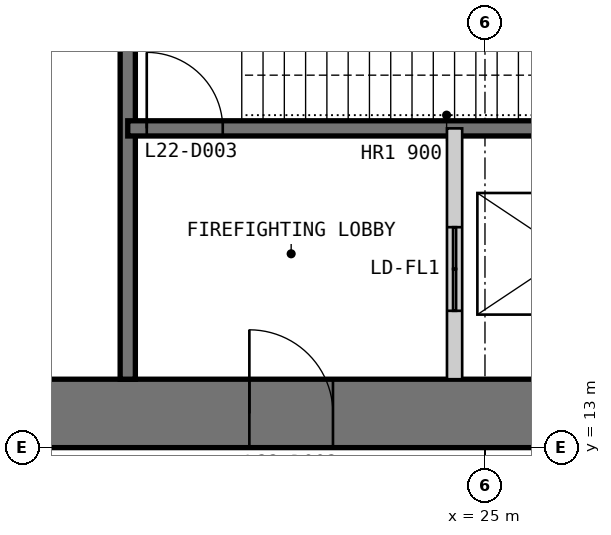
"""IFC4 building model, lengths in metres.
Left out: names, types, materials, properties, quantities, classifications, styles, units other than length and angle.
Written with IfcOpenShell. Run it as: python <this file> out.ifc"""

import sys

from ifc_helpers import new_model, si_unit, direction, frame, frame_2d, origin, place, context, subcontext, project, spatial, polyline, rectangle, outline, extrude, element, fill, save


model = new_model("IFC4")
c1 = context("Model", 3, precision=1e-05, world=origin(), true_north=direction((0.0, 1.0)))
c2 = subcontext(c1, "Body", "Model", "MODEL_VIEW")
j1 = project(units=[si_unit("LENGTHUNIT", "METRE"), si_unit("PLANEANGLEUNIT", "RADIAN")], contexts=[c1])
p1 = place(None, origin())
s1 = spatial("IfcSite", under=j1, at=p1, CompositionType="ELEMENT")
p2 = place(p1, origin())
s2 = spatial("IfcBuilding", under=s1, at=p2, CompositionType="ELEMENT")
p3 = place(p2, frame((0.0, 0.0, 97.0)))
s3 = spatial("IfcBuildingStorey", under=s2, at=p3, CompositionType="ELEMENT", Elevation=97.0)
p4 = place(p3, frame((13.0, 13.45, 0.0), z_axis=(0.0, 0.0, 1.0), x_axis=(1.0, 0.0, 0.0)))
e1 = element("IfcWall", 1, at=p4, inside=s3, PredefinedType="SHEAR", context=c2, shape_type="SweptSolid", body=[
    extrude(outline(polyline([(0.0, -0.45), (24.0, -0.45), (23.1, 0.45), (0.9, 0.45), (0.0, -0.45)])), origin(), (0.0, 0.0, 1.0), 5.4),
])
p5 = place(p4, frame((4.9, 0.0, 0.0)))
e2 = element("IfcOpeningElement", 2, at=p5, cuts=e1, PredefinedType="OPENING", context=c2, shape_type="SweptSolid", body=[
    extrude(rectangle(XDim=1.0, YDim=2.2, at=frame_2d((0.5, 1.1))), frame((0.0, 0.46, 0.0), z_axis=(0.0, -1.0, 0.0), x_axis=(1.0, 0.0, 0.0)), (0.0, 0.0, 1.0), 0.92),
])
p6 = place(p4, frame((8.9, 0.0, 0.0)))
e3 = element("IfcOpeningElement", 3, at=p6, cuts=e1, PredefinedType="OPENING", context=c2, shape_type="SweptSolid", body=[
    extrude(rectangle(XDim=1.1, YDim=2.2, at=frame_2d((0.55, 1.1))), frame((0.0, 0.46, 0.0), z_axis=(0.0, -1.0, 0.0), x_axis=(1.0, 0.0, 0.0)), (0.0, 0.0, 1.0), 0.92),
])
p7 = place(p4, frame((15.05, 0.0, 0.0)))
e4 = element("IfcOpeningElement", 4, at=p7, cuts=e1, PredefinedType="OPENING", context=c2, shape_type="SweptSolid", body=[
    extrude(rectangle(XDim=0.9, YDim=2.2, at=frame_2d((0.45, 1.1))), frame((0.0, 0.46, 0.0), z_axis=(0.0, -1.0, 0.0), x_axis=(1.0, 0.0, 0.0)), (0.0, 0.0, 1.0), 0.92),
])
p8 = place(p4, frame((17.9, 0.0, 0.0)))
e5 = element("IfcOpeningElement", 5, at=p8, cuts=e1, PredefinedType="OPENING", context=c2, shape_type="SweptSolid", body=[
    extrude(rectangle(XDim=1.0, YDim=2.2, at=frame_2d((0.5, 1.1))), frame((0.0, 0.46, 0.0), z_axis=(0.0, -1.0, 0.0), x_axis=(1.0, 0.0, 0.0)), (0.0, 0.0, 1.0), 0.92),
])
p9 = place(p4, frame((21.4, 0.0, 0.0)))
e6 = element("IfcOpeningElement", 6, at=p9, cuts=e1, PredefinedType="OPENING", context=c2, shape_type="SweptSolid", body=[
    extrude(rectangle(XDim=1.0, YDim=2.2, at=frame_2d((0.5, 1.1))), frame((0.0, 0.46, 0.0), z_axis=(0.0, -1.0, 0.0), x_axis=(1.0, 0.0, 0.0)), (0.0, 0.0, 1.0), 0.92),
])
p10 = place(p3, frame((20.3, 13.9, 0.0), z_axis=(0.0, 0.0, 1.0), x_axis=(0.0, 1.0, 0.0)))
e7 = element("IfcWall", 7, at=p10, inside=s3, PredefinedType="SOLIDWALL", context=c2, shape_type="SweptSolid", body=[
    extrude(rectangle(XDim=16.1, YDim=0.2, at=frame_2d((8.05, 0.0))), origin(), (0.0, 0.0, 1.0), 5.2),
])
p11 = place(p10, frame((7.217, 0.0, 0.0)))
e8 = element("IfcOpeningElement", 8, at=p11, cuts=e7, PredefinedType="OPENING", context=c2, shape_type="SweptSolid", body=[
    extrude(rectangle(XDim=1.1, YDim=2.2, at=frame_2d((0.55, 1.1))), frame((0.0, 0.11, 0.0), z_axis=(0.0, -1.0, 0.0), x_axis=(1.0, 0.0, 0.0)), (0.0, 0.0, 1.0), 0.22),
])
p12 = place(p10, frame((10.55, 0.0, 0.0)))
e9 = element("IfcOpeningElement", 9, at=p12, cuts=e7, PredefinedType="OPENING", context=c2, shape_type="SweptSolid", body=[
    extrude(rectangle(XDim=1.1, YDim=2.2, at=frame_2d((0.55, 1.1))), frame((0.0, 0.11, 0.0), z_axis=(0.0, -1.0, 0.0), x_axis=(1.0, 0.0, 0.0)), (0.0, 0.0, 1.0), 0.22),
])
p13 = place(p10, frame((13.883, 0.0, 0.0)))
e10 = element("IfcOpeningElement", 10, at=p13, cuts=e7, PredefinedType="OPENING", context=c2, shape_type="SweptSolid", body=[
    extrude(rectangle(XDim=1.1, YDim=2.2, at=frame_2d((0.55, 1.1))), frame((0.0, 0.11, 0.0), z_axis=(0.0, -1.0, 0.0), x_axis=(1.0, 0.0, 0.0)), (0.0, 0.0, 1.0), 0.22),
])
p14 = place(p3, frame((20.3, 17.2, 0.0), z_axis=(0.0, 0.0, 1.0), x_axis=(1.0, 0.0, 0.0)))
e11 = element("IfcWall", 11, at=p14, inside=s3, PredefinedType="SOLIDWALL", context=c2, shape_type="SweptSolid", body=[
    extrude(rectangle(XDim=9.4, YDim=0.2, at=frame_2d((4.7, 0.0))), origin(), (0.0, 0.0, 1.0), 5.2),
])
p15 = place(p14, frame((0.25, 0.0, 0.0)))
e12 = element("IfcOpeningElement", 12, at=p15, cuts=e11, PredefinedType="OPENING", context=c2, shape_type="SweptSolid", body=[
    extrude(rectangle(XDim=1.0, YDim=2.2, at=frame_2d((0.5, 1.1))), frame((0.0, 0.11, 0.0), z_axis=(0.0, -1.0, 0.0), x_axis=(1.0, 0.0, 0.0)), (0.0, 0.0, 1.0), 0.22),
])
p16 = place(p3, frame((24.6, 13.9, 0.0), z_axis=(0.0, 0.0, 1.0), x_axis=(0.0, 1.0, 0.0)))
e13 = element("IfcWall", 13, at=p16, inside=s3, PredefinedType="PARTITIONING", context=c2, shape_type="SweptSolid", body=[
    extrude(rectangle(XDim=3.3, YDim=0.2, at=frame_2d((1.65, 0.0))), origin(), (0.0, 0.0, 1.0), 5.2),
])
p17 = place(p16, frame((0.9, 0.0, 0.0)))
e14 = element("IfcOpeningElement", 14, at=p17, cuts=e13, PredefinedType="OPENING", context=c2, shape_type="SweptSolid", body=[
    extrude(rectangle(XDim=1.1, YDim=2.2, at=frame_2d((0.55, 1.1))), frame((0.0, 0.11, 0.0), z_axis=(0.0, -1.0, 0.0), x_axis=(1.0, 0.0, 0.0)), (0.0, 0.0, 1.0), 0.22),
])
p18 = place(p6, origin())
e15 = element("IfcDoor", 15, at=p18, inside=s3, OperationType="SINGLE_SWING_LEFT", PredefinedType="DOOR", context=c2, shape_type="SweptSolid", body=[
    extrude(rectangle(XDim=1.1, YDim=2.2, at=frame_2d((0.55, 1.1))), frame((0.0, 0.025, 0.0), z_axis=(0.0, -1.0, 0.0), x_axis=(1.0, 0.0, 0.0)), (0.0, 0.0, 1.0), 0.05),
    extrude(outline(polyline([(0.0, 0.0), (0.04, 0.0), (0.04, 2.16), (1.06, 2.16), (1.06, 0.0), (1.1, 0.0), (1.1, 2.2), (0.0, 2.2), (0.0, 0.0)])), frame((0.0, 0.3, 0.0), z_axis=(0.0, -1.0, 0.0), x_axis=(1.0, 0.0, 0.0)), (0.0, 0.0, 1.0), 0.6),
])
fill(e3, e15)
p19 = place(p15, origin())
e16 = element("IfcDoor", 16, at=p19, inside=s3, OperationType="SINGLE_SWING_LEFT", PredefinedType="DOOR", context=c2, shape_type="SweptSolid", body=[
    extrude(rectangle(XDim=1.0, YDim=2.2, at=frame_2d((0.5, 1.1))), frame((0.0, 0.025, 0.0), z_axis=(0.0, -1.0, 0.0), x_axis=(1.0, 0.0, 0.0)), (0.0, 0.0, 1.0), 0.05),
])
fill(e12, e16)
p20 = place(p17, origin())
e17 = element("IfcDoor", 17, at=p20, inside=s3, OperationType="DOUBLE_DOOR_SLIDING", PredefinedType="DOOR", context=c2, shape_type="SweptSolid", body=[
    extrude(rectangle(XDim=1.1, YDim=2.2, at=frame_2d((0.55, 1.1))), frame((0.0, 0.025, 0.0), z_axis=(0.0, -1.0, 0.0), x_axis=(1.0, 0.0, 0.0)), (0.0, 0.0, 1.0), 0.05),
])
fill(e14, e17)
save(model, sys.argv[1])
